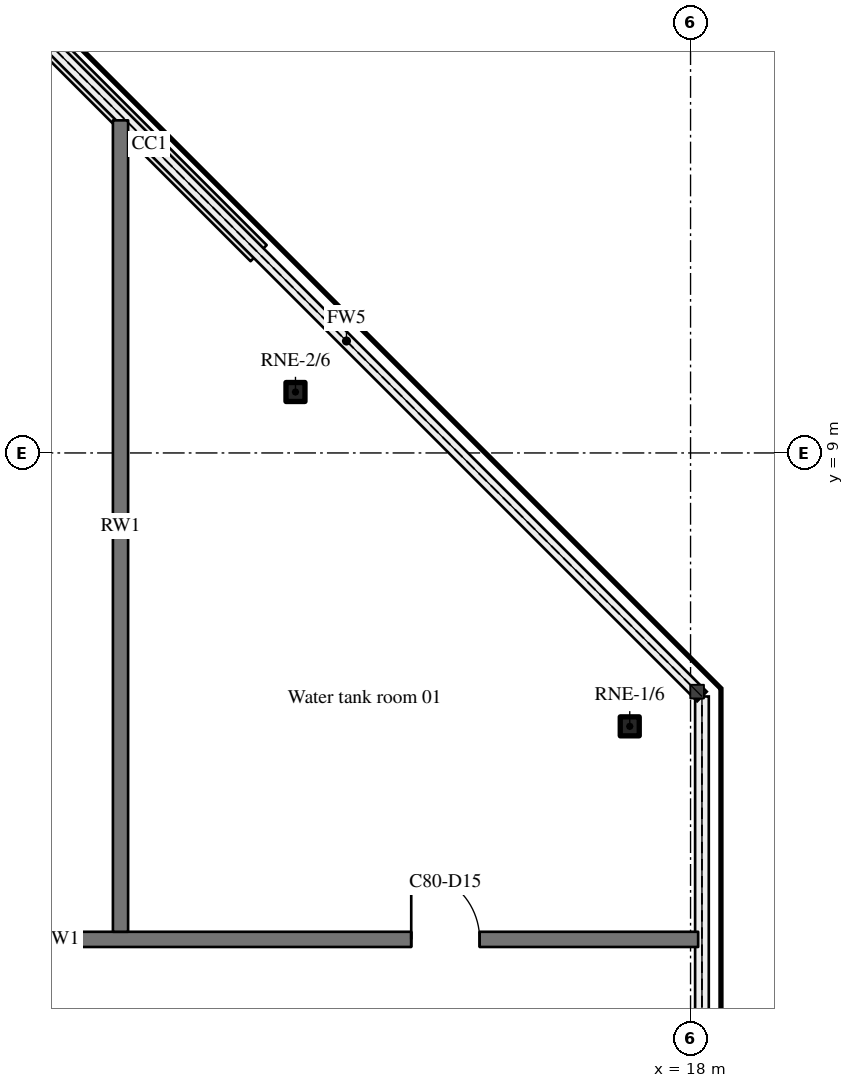
"""IFC4 building model, lengths in metres.
Left out: names, types, materials, properties, quantities, classifications, styles, units other than length and angle.
Written with IfcOpenShell. Run it as: python <this file> out.ifc"""

import sys

from ifc_helpers import new_model, si_unit, direction, frame, frame_2d, origin, origin_2d, place, context, subcontext, project, spatial, rectangle, hollow_rectangle, extrude, element, fill, save


model = new_model("IFC4")
c1 = context("Model", 3, precision=1e-05, world=origin(), true_north=direction((0.0, 1.0)))
c2 = subcontext(c1, "Body", "Model", "MODEL_VIEW")
j1 = project(units=[si_unit("LENGTHUNIT", "METRE"), si_unit("PLANEANGLEUNIT", "RADIAN")], contexts=[c1])
p1 = place(None, origin())
s1 = spatial("IfcSite", under=j1, at=p1, CompositionType="ELEMENT")
p2 = place(p1, origin())
s2 = spatial("IfcBuilding", under=s1, at=p2, CompositionType="ELEMENT")
p3 = place(p2, frame((0.0, 0.0, 297.3)))
s3 = spatial("IfcBuildingStorey", under=s2, at=p3, CompositionType="ELEMENT", Elevation=297.3)
for number, where, z_axis, x_axis in (
    (1, (17.2, 5.403, 0.0), (0.0, 0.0, 1.0), (1.0, 0.0, 0.0)),
    (2, (12.802, 9.802, 0.0), (0.0, 0.0, 1.0), (1.0, 0.0, 0.0)),
):
    element("IfcColumn", number, at=place(p3, frame(where, z_axis=z_axis, x_axis=x_axis)), inside=s3, PredefinedType="COLUMN", context=c2, shape_type="SweptSolid", body=[
        extrude(hollow_rectangle(XDim=0.25, YDim=0.25, WallThickness=0.02, InnerFilletRadius=0.03, OuterFilletRadius=0.05, at=origin_2d()), origin(), (0.0, 0.0, 1.0), 3.6),
    ])
p4 = place(p3, frame((1.3, 2.6, 0.0), z_axis=(0.0, 0.0, 1.0), x_axis=(1.0, 0.0, 0.0)))
e3 = element("IfcWall", 3, at=p4, inside=s3, PredefinedType="SOLIDWALL", context=c2, shape_type="SweptSolid", body=[
    extrude(rectangle(XDim=16.8, YDim=0.2, at=frame_2d((8.4, 0.0))), origin(), (0.0, 0.0, 1.0), 2.66),
])
p5 = place(p4, frame((1.9, 0.0, 0.0)))
e4 = element("IfcOpeningElement", 4, at=p5, cuts=e3, PredefinedType="OPENING", context=c2, shape_type="SweptSolid", body=[
    extrude(rectangle(XDim=0.9, YDim=2.1, at=frame_2d((0.45, 1.05))), frame((0.0, 0.11, 0.0), z_axis=(0.0, -1.0, 0.0), x_axis=(1.0, 0.0, 0.0)), (0.0, 0.0, 1.0), 0.22),
])
p6 = place(p4, frame((6.0, 0.0, 0.0)))
e5 = element("IfcOpeningElement", 5, at=p6, cuts=e3, PredefinedType="OPENING", context=c2, shape_type="SweptSolid", body=[
    extrude(rectangle(XDim=0.9, YDim=2.1, at=frame_2d((0.45, 1.05))), frame((0.0, 0.11, 0.0), z_axis=(0.0, -1.0, 0.0), x_axis=(1.0, 0.0, 0.0)), (0.0, 0.0, 1.0), 0.22),
])
p7 = place(p4, frame((13.025, 0.0, 0.0)))
e6 = element("IfcOpeningElement", 6, at=p7, cuts=e3, PredefinedType="OPENING", context=c2, shape_type="SweptSolid", body=[
    extrude(rectangle(XDim=0.9, YDim=2.1, at=frame_2d((0.45, 1.05))), frame((0.0, 0.11, 0.0), z_axis=(0.0, -1.0, 0.0), x_axis=(1.0, 0.0, 0.0)), (0.0, 0.0, 1.0), 0.22),
])
p8 = place(p3, frame((10.5, 2.7, 0.0), z_axis=(0.0, 0.0, 1.0), x_axis=(0.0, 1.0, 0.0)))
e7 = element("IfcWall", 7, at=p8, inside=s3, PredefinedType="SOLIDWALL", context=c2, shape_type="SweptSolid", body=[
    extrude(rectangle(XDim=10.676, YDim=0.2, at=frame_2d((5.338, 0.0))), origin(), (0.0, 0.0, 1.0), 2.66),
])
p9 = place(p7, origin())
e8 = element("IfcDoor", 8, at=p9, inside=s3, OperationType="SINGLE_SWING_LEFT", PredefinedType="DOOR", context=c2, shape_type="SweptSolid", body=[
    extrude(rectangle(XDim=0.9, YDim=2.1, at=frame_2d((0.45, 1.05))), frame((0.0, 0.025, 0.0), z_axis=(0.0, -1.0, 0.0), x_axis=(1.0, 0.0, 0.0)), (0.0, 0.0, 1.0), 0.05),
])
fill(e6, e8)
save(model, sys.argv[1])
